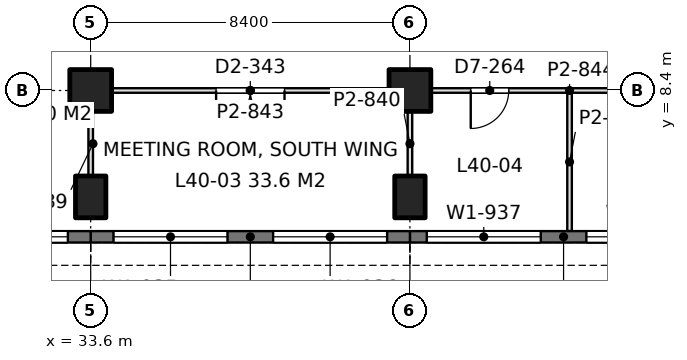
"""IFC4 building model, lengths in metres.
Left out: names, types, materials, properties, quantities, classifications, styles, units other than length and angle.
Written with IfcOpenShell. Run it as: python <this file> out.ifc"""

import sys

from ifc_helpers import new_model, si_unit, direction, frame, frame_2d, origin, origin_2d, place, context, subcontext, project, spatial, rectangle, extrude, element, fill, save


model = new_model("IFC4")
c1 = context("Model", 3, precision=1e-05, world=origin(), true_north=direction((0.0, 1.0)))
c2 = subcontext(c1, "Body", "Model", "MODEL_VIEW")
j1 = project(units=[si_unit("LENGTHUNIT", "METRE"), si_unit("PLANEANGLEUNIT", "RADIAN")], contexts=[c1])
p1 = place(None, origin())
s1 = spatial("IfcSite", under=j1, at=p1, CompositionType="ELEMENT")
p2 = place(p1, origin())
s2 = spatial("IfcBuilding", under=s1, at=p2, CompositionType="ELEMENT")
p3 = place(p2, frame((0.0, 0.0, 177.6)))
s3 = spatial("IfcBuildingStorey", under=s2, at=p3, CompositionType="ELEMENT", Elevation=177.6)
p4 = place(p3, frame((33.6, 5.6, 0.0), z_axis=(0.0, 0.0, 1.0), x_axis=(1.0, 0.0, 0.0)))
e1 = element("IfcColumn", 1, at=p4, inside=s3, PredefinedType="COLUMN", context=c2, shape_type="SweptSolid", body=[
    extrude(rectangle(XDim=0.8, YDim=1.1, at=origin_2d()), origin(), (0.0, 0.0, 1.0), 4.2),
])
p5 = place(p3, frame((33.6, 8.4, 0.0), z_axis=(0.0, 0.0, 1.0), x_axis=(1.0, 0.0, 0.0)))
e2 = element("IfcColumn", 2, at=p5, inside=s3, PredefinedType="COLUMN", context=c2, shape_type="SweptSolid", body=[
    extrude(rectangle(XDim=1.1, YDim=1.1, at=origin_2d()), origin(), (0.0, 0.0, 1.0), 4.2),
])
p6 = place(p3, frame((42.0, 5.6, 0.0), z_axis=(0.0, 0.0, 1.0), x_axis=(1.0, 0.0, 0.0)))
e3 = element("IfcColumn", 3, at=p6, inside=s3, PredefinedType="COLUMN", context=c2, shape_type="SweptSolid", body=[
    extrude(rectangle(XDim=0.8, YDim=1.1, at=origin_2d()), origin(), (0.0, 0.0, 1.0), 4.2),
])
p7 = place(p3, frame((42.0, 8.4, 0.0), z_axis=(0.0, 0.0, 1.0), x_axis=(1.0, 0.0, 0.0)))
e4 = element("IfcColumn", 4, at=p7, inside=s3, PredefinedType="COLUMN", context=c2, shape_type="SweptSolid", body=[
    extrude(rectangle(XDim=1.1, YDim=1.1, at=origin_2d()), origin(), (0.0, 0.0, 1.0), 4.2),
])
p8 = place(p3, frame((50.085, 4.55, 0.0), z_axis=(0.0, 0.0, 1.0), x_axis=(-1.0, 0.0, 0.0)))
e5 = element("IfcWall", 5, at=p8, inside=s3, PredefinedType="SOLIDWALL", context=c2, shape_type="SweptSolid", body=[
    extrude(rectangle(XDim=8.085, YDim=0.3, at=frame_2d((4.042, 0.0))), origin(), (0.0, 0.0, 1.0), 4.05),
])
p9 = place(p8, frame((0.443, 0.0, 0.9)))
e6 = element("IfcOpeningElement", 6, at=p9, cuts=e5, PredefinedType="OPENING", context=c2, shape_type="SweptSolid", body=[
    extrude(rectangle(XDim=3.0, YDim=1.9, at=frame_2d((1.5, 0.95))), frame((0.0, 0.16, 0.0), z_axis=(0.0, -1.0, 0.0), x_axis=(1.0, 0.0, 0.0)), (0.0, 0.0, 1.0), 0.32),
])
p10 = place(p8, frame((4.643, 0.0, 0.9)))
e7 = element("IfcOpeningElement", 7, at=p10, cuts=e5, PredefinedType="OPENING", context=c2, shape_type="SweptSolid", body=[
    extrude(rectangle(XDim=3.0, YDim=1.9, at=frame_2d((1.5, 0.95))), frame((0.0, 0.16, 0.0), z_axis=(0.0, -1.0, 0.0), x_axis=(1.0, 0.0, 0.0)), (0.0, 0.0, 1.0), 0.32),
])
p11 = place(p3, frame((42.0, 4.55, 0.0), z_axis=(0.0, 0.0, 1.0), x_axis=(-1.0, 0.0, 0.0)))
e8 = element("IfcWall", 8, at=p11, inside=s3, PredefinedType="SOLIDWALL", context=c2, shape_type="SweptSolid", body=[
    extrude(rectangle(XDim=8.4, YDim=0.3, at=frame_2d((4.2, 0.0))), origin(), (0.0, 0.0, 1.0), 4.05),
])
p12 = place(p11, frame((0.6, 0.0, 0.9)))
e9 = element("IfcOpeningElement", 9, at=p12, cuts=e8, PredefinedType="OPENING", context=c2, shape_type="SweptSolid", body=[
    extrude(rectangle(XDim=3.0, YDim=1.9, at=frame_2d((1.5, 0.95))), frame((0.0, 0.16, 0.0), z_axis=(0.0, -1.0, 0.0), x_axis=(1.0, 0.0, 0.0)), (0.0, 0.0, 1.0), 0.32),
])
p13 = place(p11, frame((4.8, 0.0, 0.9)))
e10 = element("IfcOpeningElement", 10, at=p13, cuts=e8, PredefinedType="OPENING", context=c2, shape_type="SweptSolid", body=[
    extrude(rectangle(XDim=3.0, YDim=1.9, at=frame_2d((1.5, 0.95))), frame((0.0, 0.16, 0.0), z_axis=(0.0, -1.0, 0.0), x_axis=(1.0, 0.0, 0.0)), (0.0, 0.0, 1.0), 0.32),
])
p14 = place(p3, frame((33.6, 4.55, 0.0), z_axis=(0.0, 0.0, 1.0), x_axis=(-1.0, 0.0, 0.0)))
e11 = element("IfcWall", 11, at=p14, inside=s3, PredefinedType="SOLIDWALL", context=c2, shape_type="SweptSolid", body=[
    extrude(rectangle(XDim=8.4, YDim=0.3, at=frame_2d((4.2, 0.0))), origin(), (0.0, 0.0, 1.0), 4.05),
])
p15 = place(p14, frame((0.6, 0.0, 0.9)))
e12 = element("IfcOpeningElement", 12, at=p15, cuts=e11, PredefinedType="OPENING", context=c2, shape_type="SweptSolid", body=[
    extrude(rectangle(XDim=3.0, YDim=1.9, at=frame_2d((1.5, 0.95))), frame((0.0, 0.16, 0.0), z_axis=(0.0, -1.0, 0.0), x_axis=(1.0, 0.0, 0.0)), (0.0, 0.0, 1.0), 0.32),
])
p16 = place(p14, frame((4.8, 0.0, 0.9)))
e13 = element("IfcOpeningElement", 13, at=p16, cuts=e11, PredefinedType="OPENING", context=c2, shape_type="SweptSolid", body=[
    extrude(rectangle(XDim=3.0, YDim=1.9, at=frame_2d((1.5, 0.95))), frame((0.0, 0.16, 0.0), z_axis=(0.0, -1.0, 0.0), x_axis=(1.0, 0.0, 0.0)), (0.0, 0.0, 1.0), 0.32),
])
p17 = place(p3, frame((34.149, 8.4, 0.0), z_axis=(0.0, 0.0, 1.0), x_axis=(1.0, 0.0, 0.0)))
e14 = element("IfcWall", 14, at=p17, inside=s3, PredefinedType="PARTITIONING", context=c2, shape_type="SweptSolid", body=[
    extrude(rectangle(XDim=7.302, YDim=0.12, at=frame_2d((3.651, 0.0))), origin(), (0.0, 0.0, 1.0), 3.55),
])
p18 = place(p17, frame((2.751, 0.0, 0.0)))
e15 = element("IfcOpeningElement", 15, at=p18, cuts=e14, PredefinedType="OPENING", context=c2, shape_type="SweptSolid", body=[
    extrude(rectangle(XDim=1.8, YDim=2.2, at=frame_2d((0.9, 1.1))), frame((0.0, 0.07, 0.0), z_axis=(0.0, -1.0, 0.0), x_axis=(1.0, 0.0, 0.0)), (0.0, 0.0, 1.0), 0.14),
])
p19 = place(p3, frame((42.549, 8.4, 0.0), z_axis=(0.0, 0.0, 1.0), x_axis=(1.0, 0.0, 0.0)))
e16 = element("IfcWall", 16, at=p19, inside=s3, PredefinedType="PARTITIONING", context=c2, shape_type="SweptSolid", body=[
    extrude(rectangle(XDim=7.302, YDim=0.12, at=frame_2d((3.651, 0.0))), origin(), (0.0, 0.0, 1.0), 3.55),
])
p20 = place(p19, frame((1.051, 0.0, 0.0)))
e17 = element("IfcOpeningElement", 17, at=p20, cuts=e16, PredefinedType="OPENING", context=c2, shape_type="SweptSolid", body=[
    extrude(rectangle(XDim=1.0, YDim=2.4, at=frame_2d((0.5, 1.2))), frame((0.0, 0.07, 0.0), z_axis=(0.0, -1.0, 0.0), x_axis=(1.0, 0.0, 0.0)), (0.0, 0.0, 1.0), 0.14),
])
p21 = place(p19, frame((5.701, 0.0, 0.0)))
e18 = element("IfcOpeningElement", 18, at=p21, cuts=e16, PredefinedType="OPENING", context=c2, shape_type="SweptSolid", body=[
    extrude(rectangle(XDim=1.0, YDim=2.4, at=frame_2d((0.5, 1.2))), frame((0.0, 0.07, 0.0), z_axis=(0.0, -1.0, 0.0), x_axis=(1.0, 0.0, 0.0)), (0.0, 0.0, 1.0), 0.14),
])
for number, where, z_axis, x_axis in (
    (19, (33.6, 6.149, 0.0), (0.0, 0.0, 1.0), (0.0, 1.0, 0.0)),
    (20, (42.0, 6.149, 0.0), (0.0, 0.0, 1.0), (0.0, 1.0, 0.0)),
):
    element("IfcWall", number, at=place(p3, frame(where, z_axis=z_axis, x_axis=x_axis)), inside=s3, PredefinedType="PARTITIONING", context=c2, shape_type="SweptSolid", body=[
        extrude(rectangle(XDim=1.702, YDim=0.12, at=frame_2d((0.851, 0.0))), origin(), (0.0, 0.0, 1.0), 3.69),
    ])
p22 = place(p3, frame((46.2, 4.7, 0.0), z_axis=(0.0, 0.0, 1.0), x_axis=(0.0, 1.0, 0.0)))
e21 = element("IfcWall", 21, at=p22, inside=s3, PredefinedType="PARTITIONING", context=c2, shape_type="SweptSolid", body=[
    extrude(rectangle(XDim=3.642, YDim=0.12, at=frame_2d((1.821, 0.0))), origin(), (0.0, 0.0, 1.0), 3.55),
])
p23 = place(p9, origin())
e22 = element("IfcWindow", 22, at=p23, inside=s3, PartitioningType="SINGLE_PANEL", PredefinedType="WINDOW", context=c2, shape_type="SweptSolid", body=[
    extrude(rectangle(XDim=3.0, YDim=1.9, at=frame_2d((1.5, 0.95))), frame((0.0, 0.03, 0.0), z_axis=(0.0, -1.0, 0.0), x_axis=(1.0, 0.0, 0.0)), (0.0, 0.0, 1.0), 0.06),
])
fill(e6, e22)
p24 = place(p10, origin())
e23 = element("IfcWindow", 23, at=p24, inside=s3, PartitioningType="SINGLE_PANEL", PredefinedType="WINDOW", context=c2, shape_type="SweptSolid", body=[
    extrude(rectangle(XDim=3.0, YDim=1.9, at=frame_2d((1.5, 0.95))), frame((0.0, 0.03, 0.0), z_axis=(0.0, -1.0, 0.0), x_axis=(1.0, 0.0, 0.0)), (0.0, 0.0, 1.0), 0.06),
])
fill(e7, e23)
p25 = place(p12, origin())
e24 = element("IfcWindow", 24, at=p25, inside=s3, PartitioningType="SINGLE_PANEL", PredefinedType="WINDOW", context=c2, shape_type="SweptSolid", body=[
    extrude(rectangle(XDim=3.0, YDim=1.9, at=frame_2d((1.5, 0.95))), frame((0.0, 0.03, 0.0), z_axis=(0.0, -1.0, 0.0), x_axis=(1.0, 0.0, 0.0)), (0.0, 0.0, 1.0), 0.06),
])
fill(e9, e24)
p26 = place(p13, origin())
e25 = element("IfcWindow", 25, at=p26, inside=s3, PartitioningType="SINGLE_PANEL", PredefinedType="WINDOW", context=c2, shape_type="SweptSolid", body=[
    extrude(rectangle(XDim=3.0, YDim=1.9, at=frame_2d((1.5, 0.95))), frame((0.0, 0.03, 0.0), z_axis=(0.0, -1.0, 0.0), x_axis=(1.0, 0.0, 0.0)), (0.0, 0.0, 1.0), 0.06),
])
fill(e10, e25)
p27 = place(p15, origin())
e26 = element("IfcWindow", 26, at=p27, inside=s3, PartitioningType="SINGLE_PANEL", PredefinedType="WINDOW", context=c2, shape_type="SweptSolid", body=[
    extrude(rectangle(XDim=3.0, YDim=1.9, at=frame_2d((1.5, 0.95))), frame((0.0, 0.03, 0.0), z_axis=(0.0, -1.0, 0.0), x_axis=(1.0, 0.0, 0.0)), (0.0, 0.0, 1.0), 0.06),
])
fill(e12, e26)
p28 = place(p18, frame((1.8, 0.0, 0.0), z_axis=(0.0, 0.0, 1.0), x_axis=(-1.0, 0.0, 0.0)))
e27 = element("IfcDoor", 27, at=p28, inside=s3, OperationType="DOUBLE_DOOR_SINGLE_SWING", PredefinedType="DOOR", context=c2, shape_type="SweptSolid", body=[
    extrude(rectangle(XDim=1.8, YDim=2.2, at=frame_2d((0.9, 1.1))), frame((0.0, 0.025, 0.0), z_axis=(0.0, -1.0, 0.0), x_axis=(1.0, 0.0, 0.0)), (0.0, 0.0, 1.0), 0.05),
])
fill(e15, e27)
p29 = place(p20, frame((1.0, 0.0, 0.0), z_axis=(0.0, 0.0, 1.0), x_axis=(-1.0, 0.0, 0.0)))
e28 = element("IfcDoor", 28, at=p29, inside=s3, OperationType="SINGLE_SWING_RIGHT", PredefinedType="DOOR", context=c2, shape_type="SweptSolid", body=[
    extrude(rectangle(XDim=1.0, YDim=2.4, at=frame_2d((0.5, 1.2))), frame((0.0, 0.025, 0.0), z_axis=(0.0, -1.0, 0.0), x_axis=(1.0, 0.0, 0.0)), (0.0, 0.0, 1.0), 0.05),
])
fill(e17, e28)
save(model, sys.argv[1])
